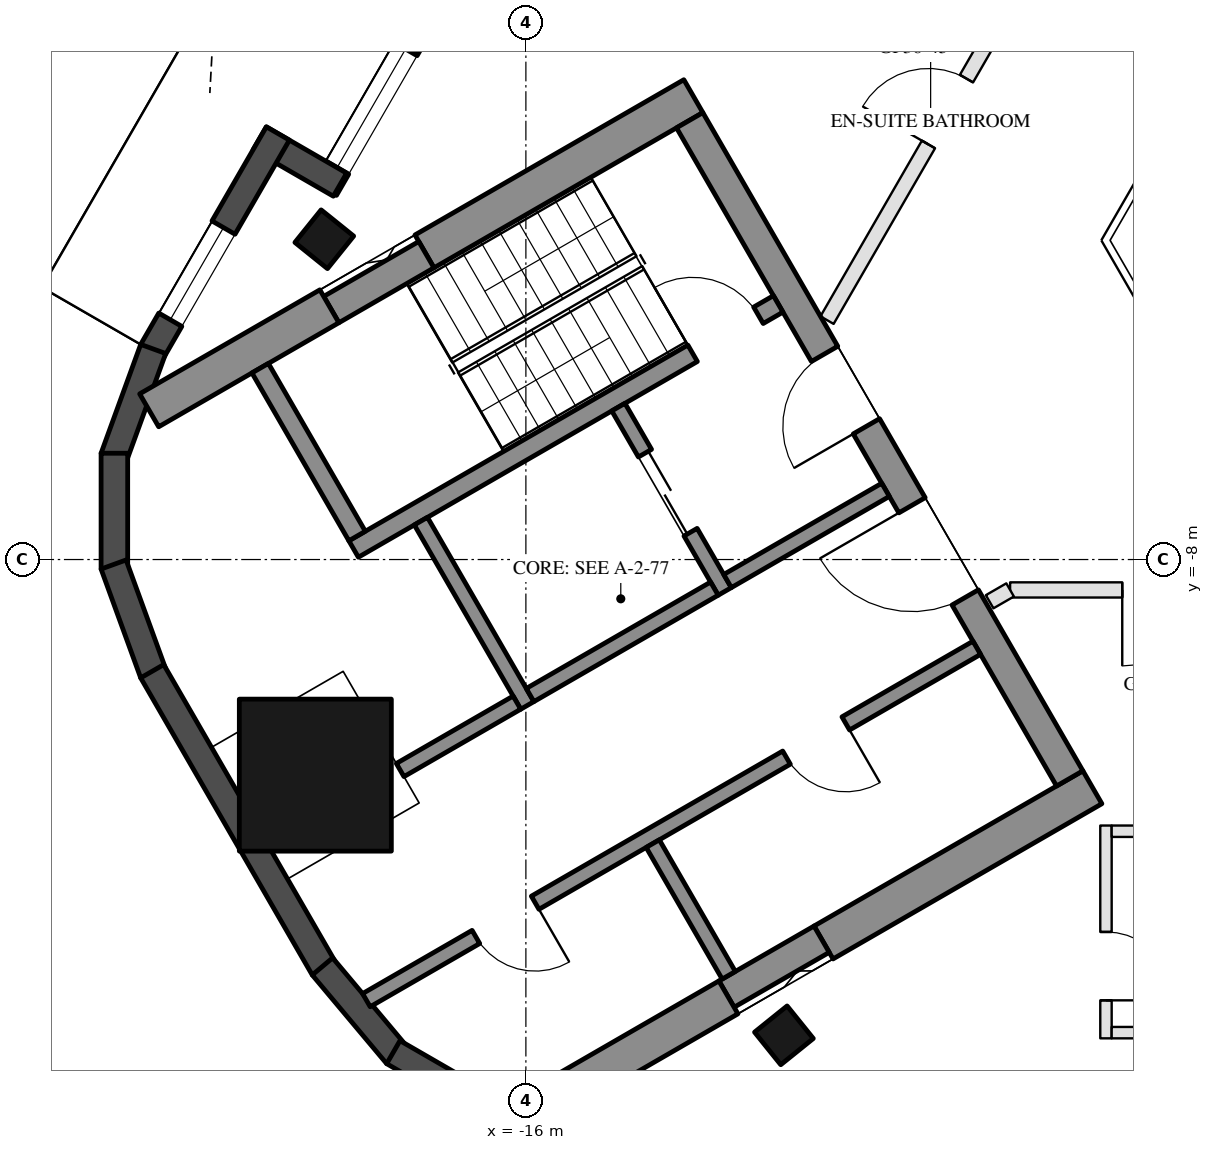
"""IFC4 building model, lengths in metres.
Left out: names, types, materials, properties, quantities, classifications, styles, units other than length and angle.
Written with IfcOpenShell. Run it as: python <this file> out.ifc"""

import sys

from ifc_helpers import new_model, si_unit, direction, frame, frame_2d, origin, origin_2d, place, context, subcontext, project, spatial, rectangle, hollow_rectangle, extrude, boolean, halfspace, element, fill, save


model = new_model("IFC4")
c1 = context("Model", 3, precision=1e-05, world=origin(), true_north=direction((0.0, 1.0)))
c2 = subcontext(c1, "Body", "Model", "MODEL_VIEW")
j1 = project(units=[si_unit("LENGTHUNIT", "METRE"), si_unit("PLANEANGLEUNIT", "RADIAN")], contexts=[c1])
p1 = place(None, origin())
s1 = spatial("IfcSite", under=j1, at=p1, CompositionType="ELEMENT")
p2 = place(p1, origin())
s2 = spatial("IfcBuilding", under=s1, at=p2, CompositionType="ELEMENT")
p3 = place(p2, frame((0.0, 0.0, 328.1)))
s3 = spatial("IfcBuildingStorey", under=s2, at=p3, CompositionType="ELEMENT", Elevation=328.1)
p4 = place(p3, frame((-12.605, -14.26, 0.0), z_axis=(0.121069901949, 0.150398600122, 0.981184151892), x_axis=(-0.992601568988, 0.00920533993, 0.121067695767)))
e1 = element("IfcColumn", 1, at=p4, inside=s3, PredefinedType="COLUMN", context=c2, shape_type="SweptSolid", body=[
    boolean("DIFFERENCE", boolean("DIFFERENCE", extrude(hollow_rectangle(XDim=0.55, YDim=0.55, WallThickness=0.025, at=origin_2d()), origin(), (0.0, 0.0, 1.0), 3.771), halfspace(frame((0.0, 0.0, 0.04), z_axis=(0.0, 0.0, 1.0), x_axis=(1.0, 0.0, 0.0)), True)), halfspace(frame((0.0, 0.0, 3.753), z_axis=(0.0, 0.0, 1.0), x_axis=(1.0, 0.0, 0.0)), False)),
])
p5 = place(p3, frame((-18.652, -3.786, 0.0), z_axis=(0.190735837279, 0.02958801006, 0.981195388309), x_axis=(-0.488607938484, -0.864067297741, 0.121037132421)))
e2 = element("IfcColumn", 2, at=p5, inside=s3, PredefinedType="COLUMN", context=c2, shape_type="SweptSolid", body=[
    boolean("DIFFERENCE", boolean("DIFFERENCE", extrude(hollow_rectangle(XDim=0.55, YDim=0.55, WallThickness=0.025, at=origin_2d()), origin(), (0.0, 0.0, 1.0), 3.771), halfspace(frame((0.0, 0.0, 0.04), z_axis=(0.0, 0.0, 1.0), x_axis=(1.0, 0.0, 0.0)), True)), halfspace(frame((0.0, 0.0, 3.753), z_axis=(0.0, 0.0, 1.0), x_axis=(1.0, 0.0, 0.0)), False)),
])
p6 = place(p3, frame((-18.77, -10.837, 0.0), z_axis=(0.190346159062, 0.109881938965, 0.975548204457), x_axis=(-0.499994868029, 0.866028366632, 1.1507946e-05)))
e3 = element("IfcColumn", 3, at=p6, inside=s3, PredefinedType="COLUMN", context=c2, shape_type="SweptSolid", body=[
    boolean("DIFFERENCE", boolean("DIFFERENCE", extrude(hollow_rectangle(XDim=2.0, YDim=2.0, WallThickness=0.05, at=origin_2d()), origin(), (0.0, 0.0, 1.0), 3.793), halfspace(frame((0.0, 0.0, 0.113), z_axis=(0.0, 0.0, 1.0), x_axis=(1.0, 0.0, 0.0)), True)), halfspace(frame((0.0, 0.0, 3.744), z_axis=(0.0, 0.0, 1.0), x_axis=(1.0, 0.0, 0.0)), False)),
])
p7 = place(p3, frame((-16.073, 1.333, 0.0), z_axis=(0.0, 0.0, 1.0), x_axis=(-0.499999159329, -0.866025889145, 0.0)))
e4 = element("IfcWall", 4, at=p7, inside=s3, PredefinedType="SOLIDWALL", context=c2, shape_type="SweptSolid", body=[
    extrude(rectangle(XDim=5.143, YDim=0.35, at=frame_2d((2.571, 0.0))), origin(), (0.0, 0.0, 1.0), 3.45),
])
p8 = place(p7, frame((0.32, 0.0, 0.0)))
e5 = element("IfcOpeningElement", 5, at=p8, cuts=e4, PredefinedType="OPENING", context=c2, shape_type="SweptSolid", body=[
    extrude(rectangle(XDim=2.4, YDim=2.4, at=frame_2d((1.2, 1.2))), frame((0.0, 0.185, 0.0), z_axis=(0.0, -1.0, 0.0), x_axis=(1.0, 0.0, 0.0)), (0.0, 0.0, 1.0), 0.37),
])
p9 = place(p7, frame((3.02, 0.0, 0.3)))
e6 = element("IfcOpeningElement", 6, at=p9, cuts=e4, PredefinedType="OPENING", context=c2, shape_type="SweptSolid", body=[
    extrude(rectangle(XDim=1.8, YDim=2.65, at=frame_2d((0.9, 1.325))), frame((0.0, 0.185, 0.0), z_axis=(0.0, -1.0, 0.0), x_axis=(1.0, 0.0, 0.0)), (0.0, 0.0, 1.0), 0.37),
])
p10 = place(p3, frame((-18.446, -3.068, 0.0), z_axis=(0.0, 0.0, 1.0), x_axis=(-0.866005645448, 0.500034220881, 0.0)))
e7 = element("IfcWall", 7, at=p10, inside=s3, PredefinedType="SOLIDWALL", context=c2, shape_type="SweptSolid", body=[
    extrude(rectangle(XDim=1.22, YDim=0.35, at=frame_2d((0.61, 0.0))), origin(), (0.0, 0.0, 1.0), 3.45),
])
p11 = place(p3, frame((-19.263, -2.394, 0.0), z_axis=(0.0, 0.0, 1.0), x_axis=(-0.500022895934, -0.866012184407, 0.0)))
e8 = element("IfcWall", 8, at=p11, inside=s3, PredefinedType="SOLIDWALL", context=c2, shape_type="SweptSolid", body=[
    extrude(rectangle(XDim=3.306, YDim=0.35, at=frame_2d((1.653, 0.0))), origin(), (0.0, 0.0, 1.0), 3.45),
])
p12 = place(p11, frame((1.43, 0.0, 0.3)))
e9 = element("IfcOpeningElement", 9, at=p12, cuts=e8, PredefinedType="OPENING", context=c2, shape_type="SweptSolid", body=[
    extrude(rectangle(XDim=1.4, YDim=2.65, at=frame_2d((0.7, 1.325))), frame((0.0, 0.185, 0.0), z_axis=(0.0, -1.0, 0.0), x_axis=(1.0, 0.0, 0.0)), (0.0, 0.0, 1.0), 0.37),
])
for number, where, z_axis, x_axis in (
    (10, (-20.903, -5.229, 0.0), (0.0, 0.0, 1.0), (-0.342, -0.94, 0.0)),
    (11, (-21.414, -6.602, 0.0), (0.0, 0.0, 1.0), (0.0, -1.0, 0.0)),
    (12, (-21.425, -8.065, 0.0), (0.0, 0.0, 1.0), (0.342, -0.94, 0.0)),
):
    element("IfcWall", number, at=place(p3, frame(where, z_axis=z_axis, x_axis=x_axis)), inside=s3, PredefinedType="SOLIDWALL", context=c2, shape_type="SweptSolid", body=[
        extrude(rectangle(XDim=1.524, YDim=0.35, at=frame_2d((0.762, 0.0))), origin(), (0.0, 0.0, 1.0), 3.45),
    ])
p13 = place(p3, frame((-20.916, -9.47, 0.0), z_axis=(0.0, 0.0, 1.0), x_axis=(0.500042384281, -0.866000931825, 0.0)))
e13 = element("IfcWall", 13, at=p13, inside=s3, PredefinedType="SOLIDWALL", context=c2, shape_type="SweptSolid", body=[
    extrude(rectangle(XDim=4.514, YDim=0.35, at=frame_2d((2.257, 0.0))), origin(), (0.0, 0.0, 1.0), 3.45),
])
p14 = place(p3, frame((-18.677, -13.354, 0.0), z_axis=(0.0, 0.0, 1.0), x_axis=(0.642812493629, -0.766023562323, 0.0)))
e14 = element("IfcWall", 14, at=p14, inside=s3, PredefinedType="SOLIDWALL", context=c2, shape_type="SweptSolid", body=[
    extrude(rectangle(XDim=1.524, YDim=0.35, at=frame_2d((0.762, 0.0))), origin(), (0.0, 0.0, 1.0), 3.45),
])
p15 = place(p3, frame((-17.744, -14.482, 0.0), z_axis=(0.0, 0.0, 1.0), x_axis=(0.8661055579, -0.499861143294, 0.0)))
e15 = element("IfcWall", 15, at=p15, inside=s3, PredefinedType="SOLIDWALL", context=c2, shape_type="SweptSolid", body=[
    extrude(rectangle(XDim=1.524, YDim=0.35, at=frame_2d((0.762, 0.0))), origin(), (0.0, 0.0, 1.0), 3.45),
])
p16 = place(p3, frame((-13.797, -1.903, 0.0), z_axis=(0.0, 0.0, 1.0), x_axis=(-0.866020367552, -0.500008722908, 0.0)))
e16 = element("IfcWall", 16, at=p16, inside=s3, PredefinedType="SHEAR", context=c2, shape_type="SweptSolid", body=[
    extrude(rectangle(XDim=4.085, YDim=0.5, at=frame_2d((2.042, 0.0))), origin(), (0.0, 0.0, 1.0), 3.45),
])
p17 = place(p3, frame((-17.309, -3.989, 0.0), z_axis=(0.0, 0.0, 1.0), x_axis=(-0.866092727722, -0.499883373386, 0.0)))
e17 = element("IfcWall", 17, at=p17, inside=s3, PredefinedType="SHEAR", context=c2, shape_type="SweptSolid", body=[
    extrude(rectangle(XDim=1.445, YDim=0.4, at=frame_2d((0.722, 0.0))), origin(), (0.0, 0.0, 1.0), 3.45),
])
p18 = place(p3, frame((-18.585, -4.668, 0.0), z_axis=(0.0, 0.0, 1.0), x_axis=(-0.866034122891, -0.49998489776, 0.0)))
e18 = element("IfcWall", 18, at=p18, inside=s3, PredefinedType="SHEAR", context=c2, shape_type="SweptSolid", body=[
    extrude(rectangle(XDim=2.738, YDim=0.5, at=frame_2d((1.369, 0.0))), origin(), (0.0, 0.0, 1.0), 3.45),
])
p19 = place(p3, frame((-8.547, -10.997, 0.0), z_axis=(0.0, 0.0, 1.0), x_axis=(-0.866031306094, -0.49998977676, 0.0)))
e19 = element("IfcWall", 19, at=p19, inside=s3, PredefinedType="SHEAR", context=c2, shape_type="SweptSolid", body=[
    extrude(rectangle(XDim=4.084, YDim=0.5, at=frame_2d((2.042, 0.0))), origin(), (0.0, 0.0, 1.0), 3.45),
])
p20 = place(p3, frame((-12.109, -12.996, 0.0), z_axis=(0.0, 0.0, 1.0), x_axis=(-0.865977303747, -0.500083302456, 0.0)))
e20 = element("IfcWall", 20, at=p20, inside=s3, PredefinedType="SHEAR", context=c2, shape_type="SweptSolid", body=[
    extrude(rectangle(XDim=1.445, YDim=0.4, at=frame_2d((0.722, 0.0))), origin(), (0.0, 0.0, 1.0), 3.45),
])
p21 = place(p3, frame((-13.335, -13.761, 0.0), z_axis=(0.0, 0.0, 1.0), x_axis=(-0.866034122891, -0.49998489776, 0.0)))
e21 = element("IfcWall", 21, at=p21, inside=s3, PredefinedType="SHEAR", context=c2, shape_type="SweptSolid", body=[
    extrude(rectangle(XDim=2.738, YDim=0.5, at=frame_2d((1.369, 0.0))), origin(), (0.0, 0.0, 1.0), 3.45),
])
p22 = place(p3, frame((-13.845, -2.22, 0.0), z_axis=(0.0, 0.0, 1.0), x_axis=(0.500004234368, -0.866022959057, 0.0)))
e22 = element("IfcWall", 22, at=p22, inside=s3, PredefinedType="SHEAR", context=c2, shape_type="SweptSolid", body=[
    extrude(rectangle(XDim=10.0, YDim=0.4, at=frame_2d((5.0, 0.0))), origin(), (0.0, 0.0, 1.0), 3.45),
])
p23 = place(p22, frame((3.55, 0.0, 0.0)))
e23 = element("IfcOpeningElement", 23, at=p23, cuts=e22, PredefinedType="OPENING", context=c2, shape_type="SweptSolid", body=[
    extrude(rectangle(XDim=1.1, YDim=2.1, at=frame_2d((0.55, 1.05))), frame((0.0, 0.21, 0.0), z_axis=(0.0, -1.0, 0.0), x_axis=(1.0, 0.0, 0.0)), (0.0, 0.0, 1.0), 0.42),
])
p24 = place(p22, frame((5.85, 0.0, 0.0)))
e24 = element("IfcOpeningElement", 24, at=p24, cuts=e22, PredefinedType="OPENING", context=c2, shape_type="SweptSolid", body=[
    extrude(rectangle(XDim=1.4, YDim=2.1, at=frame_2d((0.7, 1.05))), frame((0.0, 0.21, 0.0), z_axis=(0.0, -1.0, 0.0), x_axis=(1.0, 0.0, 0.0)), (0.0, 0.0, 1.0), 0.42),
])
p25 = place(p3, frame((-12.681, -4.636, 0.0), z_axis=(0.0, 0.0, 1.0), x_axis=(-0.866021702275, -0.500006411147, 0.0)))
e25 = element("IfcWall", 25, at=p25, inside=s3, PredefinedType="SHEAR", context=c2, shape_type="SweptSolid", body=[
    extrude(rectangle(XDim=6.45, YDim=0.25, at=frame_2d((3.225, 0.0))), origin(), (0.0, 0.0, 1.0), 3.45),
])
p26 = place(p25, frame((0.3, 0.0, 0.0)))
e26 = element("IfcOpeningElement", 26, at=p26, cuts=e25, PredefinedType="OPENING", context=c2, shape_type="SweptSolid", body=[
    extrude(rectangle(XDim=1.0, YDim=2.1, at=frame_2d((0.5, 1.05))), frame((0.0, 0.135, 0.0), z_axis=(0.0, -1.0, 0.0), x_axis=(1.0, 0.0, 0.0)), (0.0, 0.0, 1.0), 0.27),
])
p27 = place(p3, frame((-19.496, -5.482, 0.0), z_axis=(0.0, 0.0, 1.0), x_axis=(0.499990435942, -0.866030925526, 0.0)))
e27 = element("IfcWall", 27, at=p27, inside=s3, PredefinedType="SHEAR", context=c2, shape_type="SweptSolid", body=[
    extrude(rectangle(XDim=2.55, YDim=0.25, at=frame_2d((1.275, 0.0))), origin(), (0.0, 0.0, 1.0), 3.45),
])
p28 = place(p3, frame((-17.381, -7.495, 0.0), z_axis=(0.0, 0.0, 1.0), x_axis=(0.500011755427, -0.866018616679, 0.0)))
e28 = element("IfcWall", 28, at=p28, inside=s3, PredefinedType="SHEAR", context=c2, shape_type="SweptSolid", body=[
    extrude(rectangle(XDim=2.8, YDim=0.2, at=frame_2d((1.4, 0.0))), origin(), (0.0, 0.0, 1.0), 3.45),
])
p29 = place(p3, frame((-14.783, -5.995, 0.0), z_axis=(0.0, 0.0, 1.0), x_axis=(0.49994636267, -0.866056369097, 0.0)))
e29 = element("IfcWall", 29, at=p29, inside=s3, PredefinedType="SHEAR", context=c2, shape_type="SweptSolid", body=[
    extrude(rectangle(XDim=2.8, YDim=0.2, at=frame_2d((1.4, 0.0))), origin(), (0.0, 0.0, 1.0), 3.45),
])
p30 = place(p29, frame((0.7, 0.0, 0.0)))
e30 = element("IfcOpeningElement", 30, at=p30, cuts=e29, PredefinedType="OPENING", context=c2, shape_type="SweptSolid", body=[
    extrude(rectangle(XDim=1.2, YDim=2.1, at=frame_2d((0.6, 1.05))), frame((0.0, 0.11, 0.0), z_axis=(0.0, -1.0, 0.0), x_axis=(1.0, 0.0, 0.0)), (0.0, 0.0, 1.0), 0.22),
])
p31 = place(p3, frame((-13.52, -8.383, 0.0), z_axis=(0.0, 0.0, 1.0), x_axis=(-0.866034573852, -0.49998411664, 0.0)))
e31 = element("IfcWall", 31, at=p31, inside=s3, PredefinedType="SHEAR", context=c2, shape_type="SweptSolid", body=[
    extrude(rectangle(XDim=2.8, YDim=0.2, at=frame_2d((1.4, 0.0))), origin(), (0.0, 0.0, 1.0), 3.45),
])
p32 = place(p3, frame((-11.268, -7.083, 0.0), z_axis=(0.0, 0.0, 1.0), x_axis=(-0.866050077142, -0.499957262057, 0.0)))
e32 = element("IfcWall", 32, at=p32, inside=s3, PredefinedType="SHEAR", context=c2, shape_type="SweptSolid", body=[
    extrude(rectangle(XDim=2.4, YDim=0.2, at=frame_2d((1.2, 0.0))), origin(), (0.0, 0.0, 1.0), 3.45),
])
p33 = place(p3, frame((-10.068, -9.162, 0.0), z_axis=(0.0, 0.0, 1.0), x_axis=(-0.866027741594, -0.499995950774, 0.0)))
e33 = element("IfcWall", 33, at=p33, inside=s3, PredefinedType="SHEAR", context=c2, shape_type="SweptSolid", body=[
    extrude(rectangle(XDim=9.272, YDim=0.2, at=frame_2d((4.636, 0.0))), origin(), (0.0, 0.0, 1.0), 3.45),
])
p34 = place(p33, frame((1.99, 0.0, 0.0)))
e34 = element("IfcOpeningElement", 34, at=p34, cuts=e33, PredefinedType="OPENING", context=c2, shape_type="SweptSolid", body=[
    extrude(rectangle(XDim=0.9, YDim=2.1, at=frame_2d((0.45, 1.05))), frame((0.0, 0.11, 0.0), z_axis=(0.0, -1.0, 0.0), x_axis=(1.0, 0.0, 0.0)), (0.0, 0.0, 1.0), 0.22),
])
p35 = place(p33, frame((6.709, 0.0, 0.0)))
e35 = element("IfcOpeningElement", 35, at=p35, cuts=e33, PredefinedType="OPENING", context=c2, shape_type="SweptSolid", body=[
    extrude(rectangle(XDim=0.9, YDim=2.1, at=frame_2d((0.45, 1.05))), frame((0.0, 0.11, 0.0), z_axis=(0.0, -1.0, 0.0), x_axis=(1.0, 0.0, 0.0)), (0.0, 0.0, 1.0), 0.22),
])
p36 = place(p3, frame((-16.118, -9.883, 0.0), z_axis=(0.0, 0.0, 1.0), x_axis=(-0.86600680221, -0.500032217487, 0.0)))
e36 = element("IfcWall", 36, at=p36, inside=s3, PredefinedType="SHEAR", context=c2, shape_type="SweptSolid", body=[
    extrude(rectangle(XDim=1.774, YDim=0.2, at=frame_2d((0.887, 0.0))), origin(), (0.0, 0.0, 1.0), 3.45),
])
p37 = place(p3, frame((-14.331, -11.738, 0.0), z_axis=(0.0, 0.0, 1.0), x_axis=(0.499972520799, -0.866041268327, 0.0)))
e37 = element("IfcWall", 37, at=p37, inside=s3, PredefinedType="SHEAR", context=c2, shape_type="SweptSolid", body=[
    extrude(rectangle(XDim=2.0, YDim=0.2, at=frame_2d((1.0, 0.0))), origin(), (0.0, 0.0, 1.0), 3.45),
])
p38 = place(p3, frame((-5.678, -8.4, 0.0), z_axis=(0.0, 0.0, 1.0), x_axis=(-1.0, 0.0, 0.0)))
e38 = element("IfcWall", 38, at=p38, inside=s3, PredefinedType="PARTITIONING", context=c2, shape_type="SweptSolid", body=[
    extrude(rectangle(XDim=3.951, YDim=0.2, at=frame_2d((1.976, 0.0))), origin(), (0.0, 0.0, 1.0), 3.05),
])
p39 = place(p38, frame((1.476, 0.0, 0.0)))
e39 = element("IfcOpeningElement", 39, at=p39, cuts=e38, PredefinedType="OPENING", context=c2, shape_type="SweptSolid", body=[
    extrude(rectangle(XDim=1.0, YDim=2.1, at=frame_2d((0.5, 1.05))), frame((0.0, 0.11, 0.0), z_axis=(0.0, -1.0, 0.0), x_axis=(1.0, 0.0, 0.0)), (0.0, 0.0, 1.0), 0.22),
])
p40 = place(p3, frame((-9.629, -8.4, 0.0), z_axis=(0.0, 0.0, 1.0), x_axis=(-0.865963302823, -0.500107546598, 0.0)))
e40 = element("IfcWall", 40, at=p40, inside=s3, PredefinedType="PARTITIONING", context=c2, shape_type="SweptSolid", body=[
    extrude(rectangle(XDim=0.311, YDim=0.2, at=frame_2d((0.156, 0.0))), origin(), (0.0, 0.0, 1.0), 3.45),
])
p41 = place(p3, frame((-8.368, -11.5, 0.0), z_axis=(0.0, 0.0, 1.0), x_axis=(0.0, -1.0, 0.0)))
e41 = element("IfcWall", 41, at=p41, inside=s3, PredefinedType="PARTITIONING", context=c2, shape_type="SweptSolid", body=[
    extrude(rectangle(XDim=2.8, YDim=0.15, at=frame_2d((1.4, 0.0))), origin(), (0.0, 0.0, 1.0), 3.05),
])
p42 = place(p41, frame((1.4, 0.0, 0.0)))
e42 = element("IfcOpeningElement", 42, at=p42, cuts=e41, PredefinedType="OPENING", context=c2, shape_type="SweptSolid", body=[
    extrude(rectangle(XDim=0.9, YDim=2.1, at=frame_2d((0.45, 1.05))), frame((0.0, 0.085, 0.0), z_axis=(0.0, -1.0, 0.0), x_axis=(1.0, 0.0, 0.0)), (0.0, 0.0, 1.0), 0.17),
])
p43 = place(p3, frame((-8.293, -14.225, 0.0), z_axis=(0.0, 0.0, 1.0), x_axis=(1.0, 0.0, 0.0)))
e43 = element("IfcWall", 43, at=p43, inside=s3, PredefinedType="PARTITIONING", context=c2, shape_type="SweptSolid", body=[
    extrude(rectangle(XDim=1.178, YDim=0.15, at=frame_2d((0.589, 0.0))), origin(), (0.0, 0.0, 1.0), 3.45),
])
p44 = place(p3, frame((-8.293, -11.575, 0.0), z_axis=(0.0, 0.0, 1.0), x_axis=(1.0, 0.0, 0.0)))
e44 = element("IfcWall", 44, at=p44, inside=s3, PredefinedType="PARTITIONING", context=c2, shape_type="SweptSolid", body=[
    extrude(rectangle(XDim=1.832, YDim=0.15, at=frame_2d((0.916, 0.0))), origin(), (0.0, 0.0, 1.0), 3.45),
])
p45 = place(p3, frame((-12.038, -4.85, 0.0), z_axis=(0.0, 0.0, 1.0), x_axis=(0.500001049025, 0.866024798128, 0.0)))
e45 = element("IfcWall", 45, at=p45, inside=s3, PredefinedType="PARTITIONING", context=c2, shape_type="SweptSolid", body=[
    extrude(rectangle(XDim=6.119, YDim=0.2, at=frame_2d((3.06, 0.0))), origin(), (0.0, 0.0, 1.0), 3.05),
])
p46 = place(p45, frame((2.669, 0.0, 0.0)))
e46 = element("IfcOpeningElement", 46, at=p46, cuts=e45, PredefinedType="OPENING", context=c2, shape_type="SweptSolid", body=[
    extrude(rectangle(XDim=1.0, YDim=2.1, at=frame_2d((0.5, 1.05))), frame((0.0, 0.11, 0.0), z_axis=(0.0, -1.0, 0.0), x_axis=(1.0, 0.0, 0.0)), (0.0, 0.0, 1.0), 0.22),
])
p47 = place(p9, origin())
e47 = element("IfcWindow", 47, at=p47, inside=s3, PartitioningType="SINGLE_PANEL", PredefinedType="WINDOW", context=c2, shape_type="SweptSolid", body=[
    extrude(rectangle(XDim=1.8, YDim=2.65, at=frame_2d((0.9, 1.325))), frame((0.0, 0.03, 0.0), z_axis=(0.0, -1.0, 0.0), x_axis=(1.0, 0.0, 0.0)), (0.0, 0.0, 1.0), 0.06),
])
fill(e6, e47)
p48 = place(p12, origin())
e48 = element("IfcWindow", 48, at=p48, inside=s3, PartitioningType="SINGLE_PANEL", PredefinedType="WINDOW", context=c2, shape_type="SweptSolid", body=[
    extrude(rectangle(XDim=1.4, YDim=2.65, at=frame_2d((0.7, 1.325))), frame((0.0, 0.03, 0.0), z_axis=(0.0, -1.0, 0.0), x_axis=(1.0, 0.0, 0.0)), (0.0, 0.0, 1.0), 0.06),
])
fill(e9, e48)
p49 = place(p30, origin())
e49 = element("IfcDoor", 49, at=p49, inside=s3, OperationType="DOUBLE_DOOR_SLIDING", PredefinedType="DOOR", context=c2, shape_type="SweptSolid", body=[
    extrude(rectangle(XDim=1.2, YDim=2.1, at=frame_2d((0.6, 1.05))), frame((0.0, 0.025, 0.0), z_axis=(0.0, -1.0, 0.0), x_axis=(1.0, 0.0, 0.0)), (0.0, 0.0, 1.0), 0.05),
])
fill(e30, e49)
p50 = place(p34, origin())
e50 = element("IfcDoor", 50, at=p50, inside=s3, OperationType="SINGLE_SWING_LEFT", PredefinedType="DOOR", context=c2, shape_type="SweptSolid", body=[
    extrude(rectangle(XDim=0.9, YDim=2.1, at=frame_2d((0.45, 1.05))), frame((0.0, 0.025, 0.0), z_axis=(0.0, -1.0, 0.0), x_axis=(1.0, 0.0, 0.0)), (0.0, 0.0, 1.0), 0.05),
])
fill(e34, e50)
p51 = place(p35, origin())
e51 = element("IfcDoor", 51, at=p51, inside=s3, OperationType="SINGLE_SWING_LEFT", PredefinedType="DOOR", context=c2, shape_type="SweptSolid", body=[
    extrude(rectangle(XDim=0.9, YDim=2.1, at=frame_2d((0.45, 1.05))), frame((0.0, 0.025, 0.0), z_axis=(0.0, -1.0, 0.0), x_axis=(1.0, 0.0, 0.0)), (0.0, 0.0, 1.0), 0.05),
])
fill(e35, e51)
p52 = place(p23, frame((1.1, 0.0, 0.0), z_axis=(0.0, 0.0, 1.0), x_axis=(-1.0, 0.0, 0.0)))
e52 = element("IfcDoor", 52, at=p52, inside=s3, OperationType="SINGLE_SWING_LEFT", PredefinedType="DOOR", context=c2, shape_type="SweptSolid", body=[
    extrude(rectangle(XDim=1.1, YDim=2.1, at=frame_2d((0.55, 1.05))), frame((0.0, 0.025, 0.0), z_axis=(0.0, -1.0, 0.0), x_axis=(1.0, 0.0, 0.0)), (0.0, 0.0, 1.0), 0.05),
])
fill(e23, e52)
p53 = place(p24, frame((1.4, 0.0, 0.0), z_axis=(0.0, 0.0, 1.0), x_axis=(-1.0, 0.0, 0.0)))
e53 = element("IfcDoor", 53, at=p53, inside=s3, OperationType="DOUBLE_DOOR_SINGLE_SWING", PredefinedType="DOOR", context=c2, shape_type="SweptSolid", body=[
    extrude(rectangle(XDim=1.4, YDim=2.1, at=frame_2d((0.7, 1.05))), frame((0.0, 0.025, 0.0), z_axis=(0.0, -1.0, 0.0), x_axis=(1.0, 0.0, 0.0)), (0.0, 0.0, 1.0), 0.05),
])
fill(e24, e53)
p54 = place(p26, frame((1.0, 0.0, 0.0), z_axis=(0.0, 0.0, 1.0), x_axis=(-1.0, 0.0, 0.0)))
e54 = element("IfcDoor", 54, at=p54, inside=s3, OperationType="SINGLE_SWING_LEFT", PredefinedType="DOOR", context=c2, shape_type="SweptSolid", body=[
    extrude(rectangle(XDim=1.0, YDim=2.1, at=frame_2d((0.5, 1.05))), frame((0.0, 0.025, 0.0), z_axis=(0.0, -1.0, 0.0), x_axis=(1.0, 0.0, 0.0)), (0.0, 0.0, 1.0), 0.05),
])
fill(e26, e54)
p55 = place(p42, origin())
e55 = element("IfcDoor", 55, at=p55, inside=s3, OperationType="SINGLE_SWING_RIGHT", PredefinedType="DOOR", context=c2, shape_type="SweptSolid", body=[
    extrude(rectangle(XDim=0.9, YDim=2.1, at=frame_2d((0.45, 1.05))), frame((0.0, 0.025, 0.0), z_axis=(0.0, -1.0, 0.0), x_axis=(1.0, 0.0, 0.0)), (0.0, 0.0, 1.0), 0.05),
])
fill(e42, e55)
p56 = place(p39, origin())
e56 = element("IfcDoor", 56, at=p56, inside=s3, OperationType="SINGLE_SWING_RIGHT", PredefinedType="DOOR", context=c2, shape_type="SweptSolid", body=[
    extrude(rectangle(XDim=1.0, YDim=2.1, at=frame_2d((0.5, 1.05))), frame((0.0, 0.025, 0.0), z_axis=(0.0, -1.0, 0.0), x_axis=(1.0, 0.0, 0.0)), (0.0, 0.0, 1.0), 0.05),
])
fill(e39, e56)
p57 = place(p46, origin())
e57 = element("IfcDoor", 57, at=p57, inside=s3, OperationType="SINGLE_SWING_LEFT", PredefinedType="DOOR", context=c2, shape_type="SweptSolid", body=[
    extrude(rectangle(XDim=1.0, YDim=2.1, at=frame_2d((0.5, 1.05))), frame((0.0, 0.025, 0.0), z_axis=(0.0, -1.0, 0.0), x_axis=(1.0, 0.0, 0.0)), (0.0, 0.0, 1.0), 0.05),
])
fill(e46, e57)
save(model, sys.argv[1])
